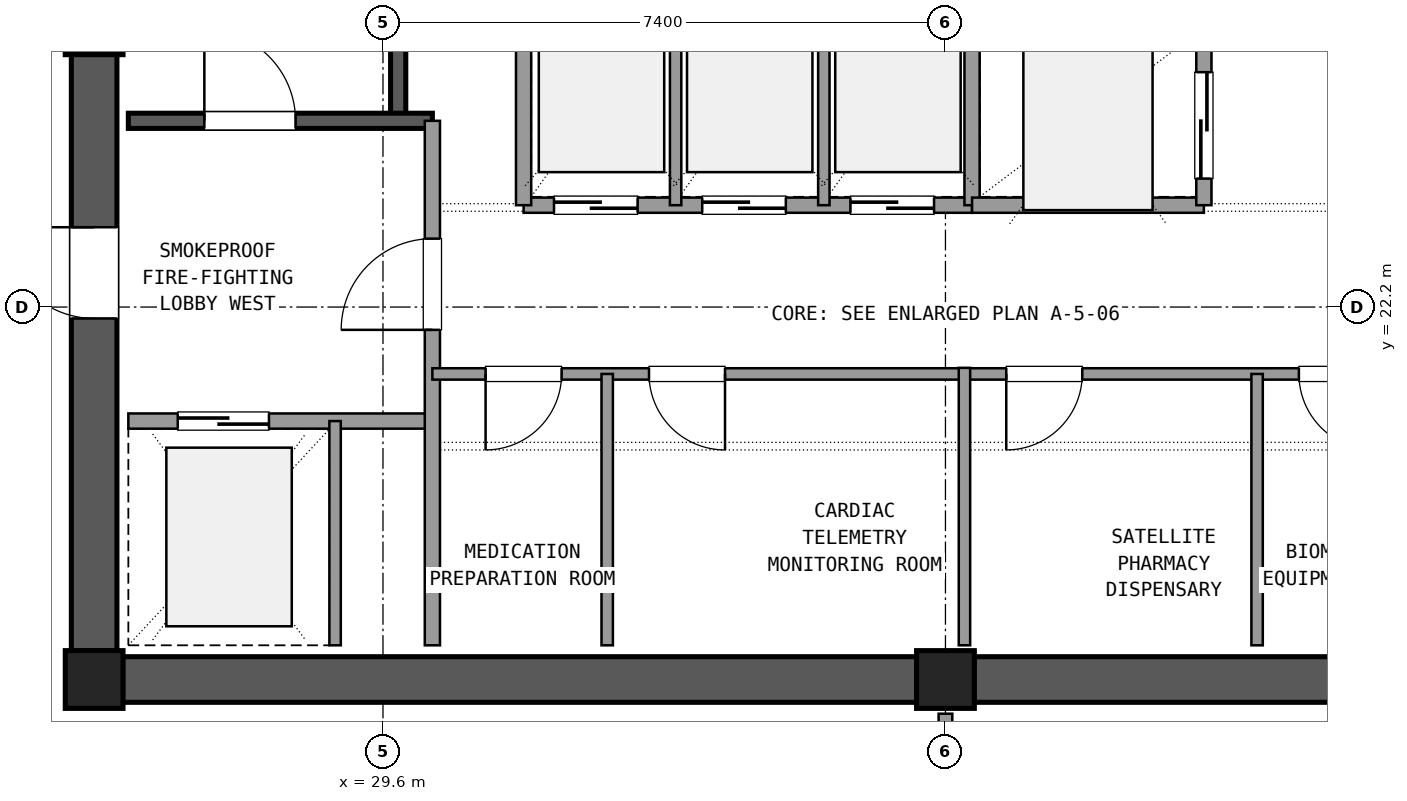
"""IFC4 building model, lengths in metres.
Left out: names, types, materials, properties, quantities, classifications, styles, units other than length and angle.
Written with IfcOpenShell. Run it as: python <this file> out.ifc"""

import sys

from ifc_helpers import new_model, si_unit, direction, frame, frame_2d, origin, origin_2d, place, context, subcontext, project, spatial, rectangle, extrude, element, fill, save


model = new_model("IFC4")
c1 = context("Model", 3, precision=1e-05, world=origin(), true_north=direction((0.0, 1.0)))
c2 = subcontext(c1, "Body", "Model", "MODEL_VIEW")
j1 = project(units=[si_unit("LENGTHUNIT", "METRE"), si_unit("PLANEANGLEUNIT", "RADIAN")], contexts=[c1])
p1 = place(None, origin())
s1 = spatial("IfcSite", under=j1, at=p1, CompositionType="ELEMENT")
p2 = place(p1, origin())
s2 = spatial("IfcBuilding", under=s1, at=p2, CompositionType="ELEMENT")
p3 = place(p2, frame((0.0, 0.0, 278.82)))
s3 = spatial("IfcBuildingStorey", under=s2, at=p3, CompositionType="ELEMENT", Elevation=278.82)
for number, where, z_axis, x_axis in (
    (1, (25.8, 17.3, 0.0), (0.0, 0.0, 1.0), (1.0, 0.0, 0.0)),
    (2, (37.0, 17.3, 0.0), (0.0, 0.0, 1.0), (1.0, 0.0, 0.0)),
    (3, (25.8, 25.9, 0.0), (0.0, 0.0, 1.0), (1.0, 0.0, 0.0)),
):
    element("IfcColumn", number, at=place(p3, frame(where, z_axis=z_axis, x_axis=x_axis)), inside=s3, PredefinedType="COLUMN", context=c2, shape_type="SweptSolid", body=[
        extrude(rectangle(XDim=0.76, YDim=0.76, at=origin_2d()), origin(), (0.0, 0.0, 1.0), 3.6),
    ])
for number, where, z_axis, x_axis in (
    (4, (26.175, 17.3, 0.0), (0.0, 0.0, 1.0), (1.0, 0.0, 0.0)),
    (5, (37.375, 17.3, 0.0), (0.0, 0.0, 1.0), (1.0, 0.0, 0.0)),
):
    element("IfcWall", number, at=place(p3, frame(where, z_axis=z_axis, x_axis=x_axis)), inside=s3, PredefinedType="SHEAR", context=c2, shape_type="SweptSolid", body=[
        extrude(rectangle(XDim=10.45, YDim=0.6, at=frame_2d((5.225, 0.0))), origin(), (0.0, 0.0, 1.0), 3.32),
    ])
p4 = place(p3, frame((25.8, 25.525, 0.0), z_axis=(0.0, 0.0, 1.0), x_axis=(0.0, -1.0, 0.0)))
e6 = element("IfcWall", 6, at=p4, inside=s3, PredefinedType="SHEAR", context=c2, shape_type="SweptSolid", body=[
    extrude(rectangle(XDim=7.85, YDim=0.6, at=frame_2d((3.925, 0.0))), origin(), (0.0, 0.0, 1.0), 3.32),
])
p5 = place(p4, frame((2.275, 0.0, 0.0)))
e7 = element("IfcOpeningElement", 7, at=p5, cuts=e6, PredefinedType="OPENING", context=c2, shape_type="SweptSolid", body=[
    extrude(rectangle(XDim=1.2, YDim=2.15, at=frame_2d((0.6, 1.075))), frame((0.0, 0.31, 0.0), z_axis=(0.0, -1.0, 0.0), x_axis=(1.0, 0.0, 0.0)), (0.0, 0.0, 1.0), 0.62),
])
p6 = place(p3, frame((29.8, 24.65, 0.0), z_axis=(0.0, 0.0, 1.0), x_axis=(0.0, 1.0, 0.0)))
e8 = element("IfcWall", 8, at=p6, inside=s3, PredefinedType="SHEAR", context=c2, shape_type="SweptSolid", body=[
    extrude(rectangle(XDim=9.4, YDim=0.2, at=frame_2d((4.7, 0.0))), origin(), (0.0, 0.0, 1.0), 3.32),
])
p7 = place(p3, frame((26.25, 24.65, 0.0), z_axis=(0.0, 0.0, 1.0), x_axis=(1.0, 0.0, 0.0)))
e9 = element("IfcWall", 9, at=p7, inside=s3, PredefinedType="SHEAR", context=c2, shape_type="SweptSolid", body=[
    extrude(rectangle(XDim=4.0, YDim=0.2, at=frame_2d((2.0, 0.0))), origin(), (0.0, 0.0, 1.0), 3.32),
])
p8 = place(p7, frame((1.0, 0.0, 0.0)))
e10 = element("IfcOpeningElement", 10, at=p8, cuts=e9, PredefinedType="OPENING", context=c2, shape_type="SweptSolid", body=[
    extrude(rectangle(XDim=1.2, YDim=2.15, at=frame_2d((0.6, 1.075))), frame((0.0, 0.11, 0.0), z_axis=(0.0, -1.0, 0.0), x_axis=(1.0, 0.0, 0.0)), (0.0, 0.0, 1.0), 0.22),
])
p9 = place(p3, frame((26.25, 20.7, 0.0), z_axis=(0.0, 0.0, 1.0), x_axis=(1.0, 0.0, 0.0)))
e11 = element("IfcWall", 11, at=p9, inside=s3, PredefinedType="SOLIDWALL", context=c2, shape_type="SweptSolid", body=[
    extrude(rectangle(XDim=4.0, YDim=0.2, at=frame_2d((2.0, 0.0))), origin(), (0.0, 0.0, 1.0), 2.61),
])
p10 = place(p9, frame((0.65, 0.0, 0.0)))
e12 = element("IfcOpeningElement", 12, at=p10, cuts=e11, PredefinedType="OPENING", context=c2, shape_type="SweptSolid", body=[
    extrude(rectangle(XDim=1.2, YDim=2.15, at=frame_2d((0.6, 1.075))), frame((0.0, 0.11, 0.0), z_axis=(0.0, -1.0, 0.0), x_axis=(1.0, 0.0, 0.0)), (0.0, 0.0, 1.0), 0.22),
])
p11 = place(p3, frame((30.25, 17.75, 0.0), z_axis=(0.0, 0.0, 1.0), x_axis=(0.0, 1.0, 0.0)))
e13 = element("IfcWall", 13, at=p11, inside=s3, PredefinedType="SOLIDWALL", context=c2, shape_type="SweptSolid", body=[
    extrude(rectangle(XDim=6.9, YDim=0.2, at=frame_2d((3.45, 0.0))), origin(), (0.0, 0.0, 1.0), 2.61),
])
p12 = place(p11, frame((4.15, 0.0, 0.0)))
e14 = element("IfcOpeningElement", 14, at=p12, cuts=e13, PredefinedType="OPENING", context=c2, shape_type="SweptSolid", body=[
    extrude(rectangle(XDim=1.2, YDim=2.15, at=frame_2d((0.6, 1.075))), frame((0.0, 0.11, 0.0), z_axis=(0.0, -1.0, 0.0), x_axis=(1.0, 0.0, 0.0)), (0.0, 0.0, 1.0), 0.22),
])
p13 = place(p3, frame((28.97, 17.75, 0.0), z_axis=(0.0, 0.0, 1.0), x_axis=(0.0, 1.0, 0.0)))
e15 = element("IfcWall", 15, at=p13, inside=s3, PredefinedType="PARTITIONING", context=c2, shape_type="SweptSolid", body=[
    extrude(rectangle(XDim=2.95, YDim=0.15, at=frame_2d((1.475, 0.0))), origin(), (0.0, 0.0, 1.0), 2.61),
])
p14 = place(p3, frame((30.25, 21.32, 0.0), z_axis=(0.0, 0.0, 1.0), x_axis=(1.0, 0.0, 0.0)))
e16 = element("IfcWall", 16, at=p14, inside=s3, PredefinedType="PARTITIONING", context=c2, shape_type="SweptSolid", body=[
    extrude(rectangle(XDim=7.0, YDim=0.15, at=frame_2d((3.5, 0.0))), origin(), (0.0, 0.0, 1.0), 2.61),
])
p15 = place(p14, frame((0.7, 0.0, 0.0)))
e17 = element("IfcOpeningElement", 17, at=p15, cuts=e16, PredefinedType="OPENING", context=c2, shape_type="SweptSolid", body=[
    extrude(rectangle(XDim=1.0, YDim=2.15, at=frame_2d((0.5, 1.075))), frame((0.0, 0.085, 0.0), z_axis=(0.0, -1.0, 0.0), x_axis=(1.0, 0.0, 0.0)), (0.0, 0.0, 1.0), 0.17),
])
p16 = place(p14, frame((2.85, 0.0, 0.0)))
e18 = element("IfcOpeningElement", 18, at=p16, cuts=e16, PredefinedType="OPENING", context=c2, shape_type="SweptSolid", body=[
    extrude(rectangle(XDim=1.0, YDim=2.15, at=frame_2d((0.5, 1.075))), frame((0.0, 0.085, 0.0), z_axis=(0.0, -1.0, 0.0), x_axis=(1.0, 0.0, 0.0)), (0.0, 0.0, 1.0), 0.17),
])
p17 = place(p3, frame((32.55, 17.75, 0.0), z_axis=(0.0, 0.0, 1.0), x_axis=(0.0, 1.0, 0.0)))
e19 = element("IfcWall", 19, at=p17, inside=s3, PredefinedType="PARTITIONING", context=c2, shape_type="SweptSolid", body=[
    extrude(rectangle(XDim=3.57, YDim=0.15, at=frame_2d((1.785, 0.0))), origin(), (0.0, 0.0, 1.0), 2.61),
])
p18 = place(p3, frame((37.25, 21.32, 0.0), z_axis=(0.0, 0.0, 1.0), x_axis=(1.0, 0.0, 0.0)))
e20 = element("IfcWall", 20, at=p18, inside=s3, PredefinedType="PARTITIONING", context=c2, shape_type="SweptSolid", body=[
    extrude(rectangle(XDim=6.1, YDim=0.15, at=frame_2d((3.05, 0.0))), origin(), (0.0, 0.0, 1.0), 2.61),
])
p19 = place(p18, frame((0.55, 0.0, 0.0)))
e21 = element("IfcOpeningElement", 21, at=p19, cuts=e20, PredefinedType="OPENING", context=c2, shape_type="SweptSolid", body=[
    extrude(rectangle(XDim=1.0, YDim=2.15, at=frame_2d((0.5, 1.075))), frame((0.0, 0.085, 0.0), z_axis=(0.0, -1.0, 0.0), x_axis=(1.0, 0.0, 0.0)), (0.0, 0.0, 1.0), 0.17),
])
p20 = place(p18, frame((4.4, 0.0, 0.0)))
e22 = element("IfcOpeningElement", 22, at=p20, cuts=e20, PredefinedType="OPENING", context=c2, shape_type="SweptSolid", body=[
    extrude(rectangle(XDim=1.0, YDim=2.15, at=frame_2d((0.5, 1.075))), frame((0.0, 0.085, 0.0), z_axis=(0.0, -1.0, 0.0), x_axis=(1.0, 0.0, 0.0)), (0.0, 0.0, 1.0), 0.17),
])
p21 = place(p3, frame((41.1, 17.75, 0.0), z_axis=(0.0, 0.0, 1.0), x_axis=(0.0, 1.0, 0.0)))
e23 = element("IfcWall", 23, at=p21, inside=s3, PredefinedType="PARTITIONING", context=c2, shape_type="SweptSolid", body=[
    extrude(rectangle(XDim=3.57, YDim=0.15, at=frame_2d((1.785, 0.0))), origin(), (0.0, 0.0, 1.0), 2.61),
])
p22 = place(p3, frame((37.25, 17.75, 0.0), z_axis=(0.0, 0.0, 1.0), x_axis=(0.0, 1.0, 0.0)))
e24 = element("IfcWall", 24, at=p22, inside=s3, PredefinedType="PARTITIONING", context=c2, shape_type="SweptSolid", body=[
    extrude(rectangle(XDim=3.65, YDim=0.15, at=frame_2d((1.825, 0.0))), origin(), (0.0, 0.0, 1.0), 2.61),
])
p23 = place(p3, frame((31.45, 23.54, 0.0), z_axis=(0.0, 0.0, 1.0), x_axis=(1.0, 0.0, 0.0)))
e25 = element("IfcWall", 25, at=p23, inside=s3, PredefinedType="SOLIDWALL", context=c2, shape_type="SweptSolid", body=[
    extrude(rectangle(XDim=5.9, YDim=0.2, at=frame_2d((2.95, 0.0))), origin(), (0.0, 0.0, 1.0), 2.61),
])
p24 = place(p23, frame((0.4, 0.0, 0.0)))
e26 = element("IfcOpeningElement", 26, at=p24, cuts=e25, PredefinedType="OPENING", context=c2, shape_type="SweptSolid", body=[
    extrude(rectangle(XDim=1.1, YDim=2.15, at=frame_2d((0.55, 1.075))), frame((0.0, 0.11, 0.0), z_axis=(0.0, -1.0, 0.0), x_axis=(1.0, 0.0, 0.0)), (0.0, 0.0, 1.0), 0.22),
])
p25 = place(p23, frame((2.35, 0.0, 0.0)))
e27 = element("IfcOpeningElement", 27, at=p25, cuts=e25, PredefinedType="OPENING", context=c2, shape_type="SweptSolid", body=[
    extrude(rectangle(XDim=1.1, YDim=2.15, at=frame_2d((0.55, 1.075))), frame((0.0, 0.11, 0.0), z_axis=(0.0, -1.0, 0.0), x_axis=(1.0, 0.0, 0.0)), (0.0, 0.0, 1.0), 0.22),
])
p26 = place(p23, frame((4.3, 0.0, 0.0)))
e28 = element("IfcOpeningElement", 28, at=p26, cuts=e25, PredefinedType="OPENING", context=c2, shape_type="SweptSolid", body=[
    extrude(rectangle(XDim=1.1, YDim=2.15, at=frame_2d((0.55, 1.075))), frame((0.0, 0.11, 0.0), z_axis=(0.0, -1.0, 0.0), x_axis=(1.0, 0.0, 0.0)), (0.0, 0.0, 1.0), 0.22),
])
p27 = place(p3, frame((31.45, 23.54, 0.0), z_axis=(0.0, 0.0, 1.0), x_axis=(0.0, 1.0, 0.0)))
e29 = element("IfcWall", 29, at=p27, inside=s3, PredefinedType="SOLIDWALL", context=c2, shape_type="SweptSolid", body=[
    extrude(rectangle(XDim=2.81, YDim=0.2, at=frame_2d((1.405, 0.0))), origin(), (0.0, 0.0, 1.0), 2.61),
])
for number, where, z_axis, x_axis in (
    (30, (33.45, 23.54, 0.0), (0.0, 0.0, 1.0), (0.0, 1.0, 0.0)),
    (31, (35.4, 23.54, 0.0), (0.0, 0.0, 1.0), (0.0, 1.0, 0.0)),
):
    element("IfcWall", number, at=place(p3, frame(where, z_axis=z_axis, x_axis=x_axis)), inside=s3, PredefinedType="PARTITIONING", context=c2, shape_type="SweptSolid", body=[
        extrude(rectangle(XDim=2.81, YDim=0.15, at=frame_2d((1.405, 0.0))), origin(), (0.0, 0.0, 1.0), 2.61),
    ])
p28 = place(p3, frame((37.35, 23.54, 0.0), z_axis=(0.0, 0.0, 1.0), x_axis=(0.0, 1.0, 0.0)))
e32 = element("IfcWall", 32, at=p28, inside=s3, PredefinedType="SOLIDWALL", context=c2, shape_type="SweptSolid", body=[
    extrude(rectangle(XDim=6.82, YDim=0.2, at=frame_2d((3.41, 0.0))), origin(), (0.0, 0.0, 1.0), 2.61),
])
p29 = place(p3, frame((37.35, 23.54, 0.0), z_axis=(0.0, 0.0, 1.0), x_axis=(1.0, 0.0, 0.0)))
e33 = element("IfcWall", 33, at=p29, inside=s3, PredefinedType="SOLIDWALL", context=c2, shape_type="SweptSolid", body=[
    extrude(rectangle(XDim=3.05, YDim=0.2, at=frame_2d((1.525, 0.0))), origin(), (0.0, 0.0, 1.0), 2.61),
])
p30 = place(p3, frame((40.4, 23.54, 0.0), z_axis=(0.0, 0.0, 1.0), x_axis=(0.0, 1.0, 0.0)))
e34 = element("IfcWall", 34, at=p30, inside=s3, PredefinedType="SOLIDWALL", context=c2, shape_type="SweptSolid", body=[
    extrude(rectangle(XDim=6.82, YDim=0.2, at=frame_2d((3.41, 0.0))), origin(), (0.0, 0.0, 1.0), 2.61),
])
p31 = place(p30, frame((0.35, 0.0, 0.0)))
e35 = element("IfcOpeningElement", 35, at=p31, cuts=e34, PredefinedType="OPENING", context=c2, shape_type="SweptSolid", body=[
    extrude(rectangle(XDim=1.4, YDim=2.2, at=frame_2d((0.7, 1.1))), frame((0.0, 0.11, 0.0), z_axis=(0.0, -1.0, 0.0), x_axis=(1.0, 0.0, 0.0)), (0.0, 0.0, 1.0), 0.22),
])
p32 = place(p30, frame((2.65, 0.0, 0.0)))
e36 = element("IfcOpeningElement", 36, at=p32, cuts=e34, PredefinedType="OPENING", context=c2, shape_type="SweptSolid", body=[
    extrude(rectangle(XDim=1.4, YDim=2.2, at=frame_2d((0.7, 1.1))), frame((0.0, 0.11, 0.0), z_axis=(0.0, -1.0, 0.0), x_axis=(1.0, 0.0, 0.0)), (0.0, 0.0, 1.0), 0.22),
])
p33 = place(p30, frame((4.85, 0.0, 0.0)))
e37 = element("IfcOpeningElement", 37, at=p33, cuts=e34, PredefinedType="OPENING", context=c2, shape_type="SweptSolid", body=[
    extrude(rectangle(XDim=1.4, YDim=2.2, at=frame_2d((0.7, 1.1))), frame((0.0, 0.11, 0.0), z_axis=(0.0, -1.0, 0.0), x_axis=(1.0, 0.0, 0.0)), (0.0, 0.0, 1.0), 0.22),
])
p34 = place(p3, frame((37.0, 14.15, 0.0), z_axis=(0.0, 0.0, 1.0), x_axis=(0.0, 1.0, 0.0)))
e38 = element("IfcWall", 38, at=p34, inside=s3, PredefinedType="PARTITIONING", context=c2, shape_type="SweptSolid", body=[
    extrude(rectangle(XDim=2.7, YDim=0.18, at=frame_2d((1.35, 0.0))), origin(), (0.0, 0.0, 1.0), 2.61),
])
p35 = place(p34, frame((0.35, 0.0, 0.0)))
e39 = element("IfcOpeningElement", 39, at=p35, cuts=e38, PredefinedType="OPENING", context=c2, shape_type="SweptSolid", body=[
    extrude(rectangle(XDim=2.0, YDim=2.2, at=frame_2d((1.0, 1.1))), frame((0.0, 0.1, 0.0), z_axis=(0.0, -1.0, 0.0), x_axis=(1.0, 0.0, 0.0)), (0.0, 0.0, 1.0), 0.2),
])
p36 = place(p8, origin())
e40 = element("IfcDoor", 40, at=p36, inside=s3, OperationType="SINGLE_SWING_LEFT", PredefinedType="DOOR", context=c2, shape_type="SweptSolid", body=[
    extrude(rectangle(XDim=1.2, YDim=2.15, at=frame_2d((0.6, 1.075))), frame((0.0, 0.025, 0.0), z_axis=(0.0, -1.0, 0.0), x_axis=(1.0, 0.0, 0.0)), (0.0, 0.0, 1.0), 0.05),
])
fill(e10, e40)
p37 = place(p10, origin())
e41 = element("IfcDoor", 41, at=p37, inside=s3, OperationType="SLIDING_TO_LEFT", PredefinedType="DOOR", context=c2, shape_type="SweptSolid", body=[
    extrude(rectangle(XDim=1.2, YDim=2.15, at=frame_2d((0.6, 1.075))), frame((0.0, 0.025, 0.0), z_axis=(0.0, -1.0, 0.0), x_axis=(1.0, 0.0, 0.0)), (0.0, 0.0, 1.0), 0.05),
])
fill(e12, e41)
p38 = place(p12, origin())
e42 = element("IfcDoor", 42, at=p38, inside=s3, OperationType="SINGLE_SWING_LEFT", PredefinedType="DOOR", context=c2, shape_type="SweptSolid", body=[
    extrude(rectangle(XDim=1.2, YDim=2.15, at=frame_2d((0.6, 1.075))), frame((0.0, 0.025, 0.0), z_axis=(0.0, -1.0, 0.0), x_axis=(1.0, 0.0, 0.0)), (0.0, 0.0, 1.0), 0.05),
])
fill(e14, e42)
p39 = place(p5, frame((1.2, 0.0, 0.0), z_axis=(0.0, 0.0, 1.0), x_axis=(-1.0, 0.0, 0.0)))
e43 = element("IfcDoor", 43, at=p39, inside=s3, OperationType="SINGLE_SWING_LEFT", PredefinedType="DOOR", context=c2, shape_type="SweptSolid", body=[
    extrude(rectangle(XDim=1.2, YDim=2.15, at=frame_2d((0.6, 1.075))), frame((0.0, 0.025, 0.0), z_axis=(0.0, -1.0, 0.0), x_axis=(1.0, 0.0, 0.0)), (0.0, 0.0, 1.0), 0.05),
])
fill(e7, e43)
p40 = place(p15, frame((1.0, 0.0, 0.0), z_axis=(0.0, 0.0, 1.0), x_axis=(-1.0, 0.0, 0.0)))
e44 = element("IfcDoor", 44, at=p40, inside=s3, OperationType="SINGLE_SWING_LEFT", PredefinedType="DOOR", context=c2, shape_type="SweptSolid", body=[
    extrude(rectangle(XDim=1.0, YDim=2.15, at=frame_2d((0.5, 1.075))), frame((0.0, 0.025, 0.0), z_axis=(0.0, -1.0, 0.0), x_axis=(1.0, 0.0, 0.0)), (0.0, 0.0, 1.0), 0.05),
])
fill(e17, e44)
p41 = place(p16, frame((1.0, 0.0, 0.0), z_axis=(0.0, 0.0, 1.0), x_axis=(-1.0, 0.0, 0.0)))
e45 = element("IfcDoor", 45, at=p41, inside=s3, OperationType="SINGLE_SWING_RIGHT", PredefinedType="DOOR", context=c2, shape_type="SweptSolid", body=[
    extrude(rectangle(XDim=1.0, YDim=2.15, at=frame_2d((0.5, 1.075))), frame((0.0, 0.025, 0.0), z_axis=(0.0, -1.0, 0.0), x_axis=(1.0, 0.0, 0.0)), (0.0, 0.0, 1.0), 0.05),
])
fill(e18, e45)
p42 = place(p19, frame((1.0, 0.0, 0.0), z_axis=(0.0, 0.0, 1.0), x_axis=(-1.0, 0.0, 0.0)))
e46 = element("IfcDoor", 46, at=p42, inside=s3, OperationType="SINGLE_SWING_LEFT", PredefinedType="DOOR", context=c2, shape_type="SweptSolid", body=[
    extrude(rectangle(XDim=1.0, YDim=2.15, at=frame_2d((0.5, 1.075))), frame((0.0, 0.025, 0.0), z_axis=(0.0, -1.0, 0.0), x_axis=(1.0, 0.0, 0.0)), (0.0, 0.0, 1.0), 0.05),
])
fill(e21, e46)
p43 = place(p20, frame((1.0, 0.0, 0.0), z_axis=(0.0, 0.0, 1.0), x_axis=(-1.0, 0.0, 0.0)))
e47 = element("IfcDoor", 47, at=p43, inside=s3, OperationType="SINGLE_SWING_RIGHT", PredefinedType="DOOR", context=c2, shape_type="SweptSolid", body=[
    extrude(rectangle(XDim=1.0, YDim=2.15, at=frame_2d((0.5, 1.075))), frame((0.0, 0.025, 0.0), z_axis=(0.0, -1.0, 0.0), x_axis=(1.0, 0.0, 0.0)), (0.0, 0.0, 1.0), 0.05),
])
fill(e22, e47)
p44 = place(p24, origin())
e48 = element("IfcDoor", 48, at=p44, inside=s3, OperationType="SLIDING_TO_RIGHT", PredefinedType="DOOR", context=c2, shape_type="SweptSolid", body=[
    extrude(rectangle(XDim=1.1, YDim=2.15, at=frame_2d((0.55, 1.075))), frame((0.0, 0.025, 0.0), z_axis=(0.0, -1.0, 0.0), x_axis=(1.0, 0.0, 0.0)), (0.0, 0.0, 1.0), 0.05),
])
fill(e26, e48)
p45 = place(p25, origin())
e49 = element("IfcDoor", 49, at=p45, inside=s3, OperationType="SLIDING_TO_RIGHT", PredefinedType="DOOR", context=c2, shape_type="SweptSolid", body=[
    extrude(rectangle(XDim=1.1, YDim=2.15, at=frame_2d((0.55, 1.075))), frame((0.0, 0.025, 0.0), z_axis=(0.0, -1.0, 0.0), x_axis=(1.0, 0.0, 0.0)), (0.0, 0.0, 1.0), 0.05),
])
fill(e27, e49)
p46 = place(p26, origin())
e50 = element("IfcDoor", 50, at=p46, inside=s3, OperationType="SLIDING_TO_RIGHT", PredefinedType="DOOR", context=c2, shape_type="SweptSolid", body=[
    extrude(rectangle(XDim=1.1, YDim=2.15, at=frame_2d((0.55, 1.075))), frame((0.0, 0.025, 0.0), z_axis=(0.0, -1.0, 0.0), x_axis=(1.0, 0.0, 0.0)), (0.0, 0.0, 1.0), 0.05),
])
fill(e28, e50)
p47 = place(p31, origin())
e51 = element("IfcDoor", 51, at=p47, inside=s3, OperationType="SLIDING_TO_LEFT", PredefinedType="DOOR", context=c2, shape_type="SweptSolid", body=[
    extrude(rectangle(XDim=1.4, YDim=2.2, at=frame_2d((0.7, 1.1))), frame((0.0, 0.025, 0.0), z_axis=(0.0, -1.0, 0.0), x_axis=(1.0, 0.0, 0.0)), (0.0, 0.0, 1.0), 0.05),
])
fill(e35, e51)
save(model, sys.argv[1])
